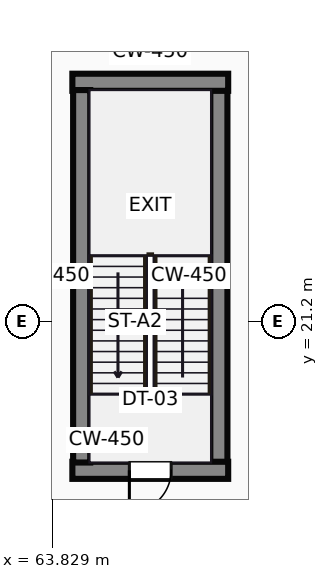
"""IFC4 building model, lengths in metres.
Left out: names, types, materials, properties, quantities, classifications, styles, units other than length and angle.
Written with IfcOpenShell. Run it as: python <this file> out.ifc"""

import sys

from ifc_helpers import new_model, si_unit, direction, frame, frame_2d, origin, place, context, subcontext, project, spatial, rectangle, extrude, source, transform, mapped, element, fill, save


model = new_model("IFC4")
c1 = context("Model", 3, precision=1e-05, world=origin(), true_north=direction((0.0, 1.0)))
c2 = subcontext(c1, "Body", "Model", "MODEL_VIEW")
j1 = project(units=[si_unit("LENGTHUNIT", "METRE"), si_unit("PLANEANGLEUNIT", "RADIAN")], contexts=[c1])
p1 = place(None, origin())
s1 = spatial("IfcSite", under=j1, at=p1, CompositionType="ELEMENT")
p2 = place(p1, origin())
s2 = spatial("IfcBuilding", under=s1, at=p2, CompositionType="ELEMENT")
p3 = place(p2, frame((0.0, 0.0, 11.0)))
s3 = spatial("IfcBuildingStorey", under=s2, at=p3, CompositionType="ELEMENT", Elevation=11.0)
m1 = source(origin(), c2, "Body", "SweptSolid", [
    extrude(rectangle(XDim=4.1, YDim=0.45, at=frame_2d((2.05, 0.0))), origin(), (0.0, 0.0, 1.0), 5.0),
])
p4 = place(p3, frame((64.35, 17.295, 0.0), z_axis=(0.0, 0.0, 1.0), x_axis=(1.0, 0.0, 0.0)))
e1 = element("IfcWall", 1, at=p4, inside=s3, PredefinedType="SHEAR", context=c2, shape_type="MappedRepresentation", body=[
    mapped(m1, transform((0.0, 0.0, 0.0))),
])
p5 = place(p4, frame((1.5, 0.0, 0.0)))
e2 = element("IfcOpeningElement", 2, at=p5, cuts=e1, PredefinedType="OPENING", context=c2, shape_type="SweptSolid", body=[
    extrude(rectangle(XDim=1.1, YDim=2.15, at=frame_2d((0.55, 1.075))), frame((0.0, 0.235, 0.0), z_axis=(0.0, -1.0, 0.0), x_axis=(1.0, 0.0, 0.0)), (0.0, 0.0, 1.0), 0.47),
])
m2 = source(origin(), c2, "Body", "SweptSolid", [
    extrude(rectangle(XDim=9.8, YDim=0.45, at=frame_2d((4.9, 0.0))), origin(), (0.0, 0.0, 1.0), 5.0),
])
for number, where, z_axis, x_axis in (
    (3, (64.595, 17.5, 0.0), (0.0, 0.0, 1.0), (0.0, 1.0, 0.0)),
    (4, (68.205, 17.5, 0.0), (0.0, 0.0, 1.0), (0.0, 1.0, 0.0)),
):
    element("IfcWall", number, at=place(p3, frame(where, z_axis=z_axis, x_axis=x_axis)), inside=s3, PredefinedType="SHEAR", context=c2, shape_type="MappedRepresentation", body=[
        mapped(m2, transform((0.0, 0.0, 0.0))),
    ])
p6 = place(p3, frame((64.35, 27.505, 0.0), z_axis=(0.0, 0.0, 1.0), x_axis=(1.0, 0.0, 0.0)))
e5 = element("IfcWall", 5, at=p6, inside=s3, PredefinedType="SHEAR", context=c2, shape_type="MappedRepresentation", body=[
    mapped(m1, transform((0.0, 0.0, 0.0))),
])
m3 = source(origin(), c2, "Body", "SweptSolid", [
    extrude(rectangle(XDim=1.1, YDim=2.15, at=frame_2d((0.55, 1.075))), frame((0.0, 0.025, 0.0), z_axis=(0.0, -1.0, 0.0), x_axis=(1.0, 0.0, 0.0)), (0.0, 0.0, 1.0), 0.05),
])
p7 = place(p5, origin())
e6 = element("IfcDoor", 6, at=p7, inside=s3, OperationType="SINGLE_SWING_LEFT", PredefinedType="DOOR", context=c2, shape_type="MappedRepresentation", body=[
    mapped(m3, transform((0.0, 0.0, 0.0))),
])
fill(e2, e6)
save(model, sys.argv[1])
